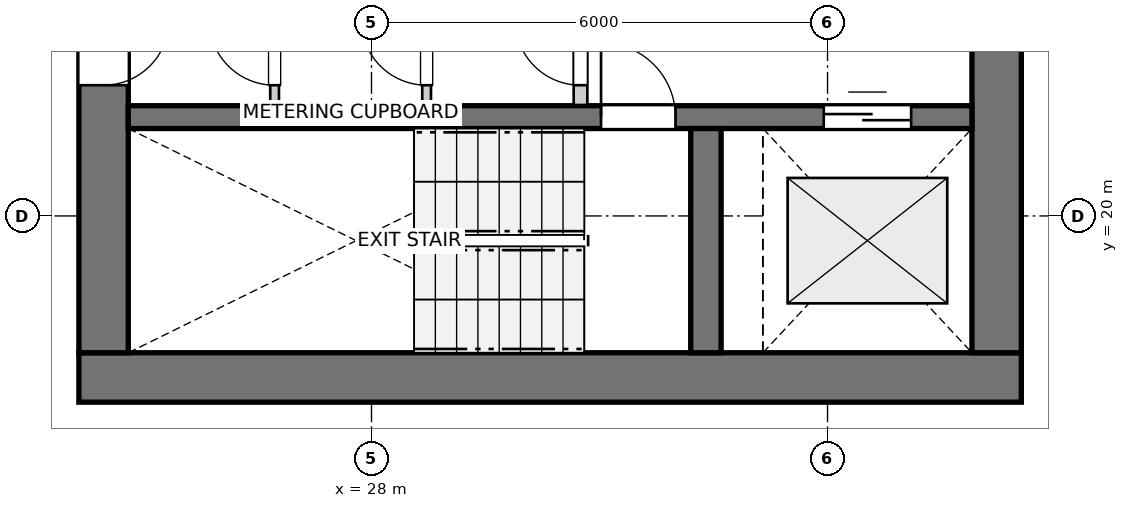
"""IFC4 building model, lengths in metres.
Left out: names, types, materials, properties, quantities, classifications, styles, units other than length and angle.
Written with IfcOpenShell. Run it as: python <this file> out.ifc"""

import sys

from ifc_helpers import new_model, si_unit, direction, frame, frame_2d, origin, place, context, subcontext, project, spatial, rectangle, extrude, source, transform, mapped, element, fill, save


model = new_model("IFC4")
c1 = context("Model", 3, precision=1e-05, world=origin(), true_north=direction((0.0, 1.0)))
c2 = subcontext(c1, "Body", "Model", "MODEL_VIEW")
j1 = project(units=[si_unit("LENGTHUNIT", "METRE"), si_unit("PLANEANGLEUNIT", "RADIAN")], contexts=[c1])
p1 = place(None, origin())
s1 = spatial("IfcSite", under=j1, at=p1, CompositionType="ELEMENT")
p2 = place(p1, origin())
s2 = spatial("IfcBuilding", under=s1, at=p2, CompositionType="ELEMENT")
p3 = place(p2, frame((0.0, 0.0, 124.8)))
s3 = spatial("IfcBuildingStorey", under=s2, at=p3, CompositionType="ELEMENT", Elevation=124.8)
p4 = place(p3, frame((24.15, 17.875, 0.0), z_axis=(0.0, 0.0, 1.0), x_axis=(1.0, 0.0, 0.0)))
e1 = element("IfcWall", 1, at=p4, inside=s3, PredefinedType="SHEAR", context=c2, shape_type="SweptSolid", body=[
    extrude(rectangle(XDim=12.4, YDim=0.65, at=frame_2d((6.2, 0.0))), origin(), (0.0, 0.0, 1.0), 2.9),
])
p5 = place(p3, frame((24.475, 33.8, 0.0), z_axis=(0.0, 0.0, 1.0), x_axis=(0.0, -1.0, 0.0)))
e2 = element("IfcWall", 2, at=p5, inside=s3, PredefinedType="SHEAR", context=c2, shape_type="SweptSolid", body=[
    extrude(rectangle(XDim=15.6, YDim=0.65, at=frame_2d((7.8, 0.0))), origin(), (0.0, 0.0, 1.0), 2.9),
])
p6 = place(p5, frame((7.05, 0.0, 0.0)))
e3 = element("IfcOpeningElement", 3, at=p6, cuts=e2, PredefinedType="OPENING", context=c2, shape_type="SweptSolid", body=[
    extrude(rectangle(XDim=1.5, YDim=2.15, at=frame_2d((0.75, 1.075))), frame((0.0, 0.335, 0.0), z_axis=(0.0, -1.0, 0.0), x_axis=(1.0, 0.0, 0.0)), (0.0, 0.0, 1.0), 0.67),
])
p7 = place(p5, frame((3.52, 0.0, 0.0)))
e4 = element("IfcOpeningElement", 4, at=p7, cuts=e2, PredefinedType="OPENING", context=c2, shape_type="SweptSolid", body=[
    extrude(rectangle(XDim=0.86, YDim=2.05, at=frame_2d((0.43, 1.025))), frame((0.0, 0.335, 0.0), z_axis=(0.0, -1.0, 0.0), x_axis=(1.0, 0.0, 0.0)), (0.0, 0.0, 1.0), 0.67),
])
p8 = place(p5, frame((11.22, 0.0, 0.0)))
e5 = element("IfcOpeningElement", 5, at=p8, cuts=e2, PredefinedType="OPENING", context=c2, shape_type="SweptSolid", body=[
    extrude(rectangle(XDim=0.86, YDim=2.05, at=frame_2d((0.43, 1.025))), frame((0.0, 0.335, 0.0), z_axis=(0.0, -1.0, 0.0), x_axis=(1.0, 0.0, 0.0)), (0.0, 0.0, 1.0), 0.67),
])
p9 = place(p3, frame((36.225, 18.2, 0.0), z_axis=(0.0, 0.0, 1.0), x_axis=(0.0, 1.0, 0.0)))
e6 = element("IfcWall", 6, at=p9, inside=s3, PredefinedType="SHEAR", context=c2, shape_type="SweptSolid", body=[
    extrude(rectangle(XDim=15.6, YDim=0.65, at=frame_2d((7.8, 0.0))), origin(), (0.0, 0.0, 1.0), 2.9),
])
p10 = place(p9, frame((4.25, 0.0, 0.0)))
e7 = element("IfcOpeningElement", 7, at=p10, cuts=e6, PredefinedType="OPENING", context=c2, shape_type="SweptSolid", body=[
    extrude(rectangle(XDim=1.1, YDim=2.15, at=frame_2d((0.55, 1.075))), frame((0.0, 0.335, 0.0), z_axis=(0.0, -1.0, 0.0), x_axis=(1.0, 0.0, 0.0)), (0.0, 0.0, 1.0), 0.67),
])
p11 = place(p9, frame((10.25, 0.0, 0.0)))
e8 = element("IfcOpeningElement", 8, at=p11, cuts=e6, PredefinedType="OPENING", context=c2, shape_type="SweptSolid", body=[
    extrude(rectangle(XDim=1.1, YDim=2.15, at=frame_2d((0.55, 1.075))), frame((0.0, 0.335, 0.0), z_axis=(0.0, -1.0, 0.0), x_axis=(1.0, 0.0, 0.0)), (0.0, 0.0, 1.0), 0.67),
])
p12 = place(p3, frame((24.8, 21.3, 0.0), z_axis=(0.0, 0.0, 1.0), x_axis=(1.0, 0.0, 0.0)))
e9 = element("IfcWall", 9, at=p12, inside=s3, PredefinedType="SHEAR", context=c2, shape_type="SweptSolid", body=[
    extrude(rectangle(XDim=11.1, YDim=0.3, at=frame_2d((5.55, 0.0))), origin(), (0.0, 0.0, 1.0), 2.9),
])
p13 = place(p12, frame((6.22, 0.0, 0.0)))
e10 = element("IfcOpeningElement", 10, at=p13, cuts=e9, PredefinedType="OPENING", context=c2, shape_type="SweptSolid", body=[
    extrude(rectangle(XDim=0.98, YDim=2.15, at=frame_2d((0.49, 1.075))), frame((0.0, 0.16, 0.0), z_axis=(0.0, -1.0, 0.0), x_axis=(1.0, 0.0, 0.0)), (0.0, 0.0, 1.0), 0.32),
])
p14 = place(p12, frame((9.15, 0.0, 0.0)))
e11 = element("IfcOpeningElement", 11, at=p14, cuts=e9, PredefinedType="OPENING", context=c2, shape_type="SweptSolid", body=[
    extrude(rectangle(XDim=1.15, YDim=2.15, at=frame_2d((0.575, 1.075))), frame((0.0, 0.16, 0.0), z_axis=(0.0, -1.0, 0.0), x_axis=(1.0, 0.0, 0.0)), (0.0, 0.0, 1.0), 0.32),
])
p15 = place(p3, frame((32.4, 18.2, 0.0), z_axis=(0.0, 0.0, 1.0), x_axis=(0.0, 1.0, 0.0)))
e12 = element("IfcWall", 12, at=p15, inside=s3, PredefinedType="SHEAR", context=c2, shape_type="SweptSolid", body=[
    extrude(rectangle(XDim=2.95, YDim=0.4, at=frame_2d((1.475, 0.0))), origin(), (0.0, 0.0, 1.0), 2.9),
])
p16 = place(p3, frame((30.75, 21.46, 0.0), z_axis=(0.0, 0.0, 1.0), x_axis=(0.0, 1.0, 0.0)))
e13 = element("IfcWall", 13, at=p16, inside=s3, PredefinedType="PARTITIONING", context=c2, shape_type="SweptSolid", body=[
    extrude(rectangle(XDim=3.11, YDim=0.18, at=frame_2d((1.555, 0.0))), origin(), (0.0, 0.0, 1.0), 2.9),
])
p17 = place(p16, frame((0.26, 0.0, 0.0)))
e14 = element("IfcOpeningElement", 14, at=p17, cuts=e13, PredefinedType="OPENING", context=c2, shape_type="SweptSolid", body=[
    extrude(rectangle(XDim=0.86, YDim=2.05, at=frame_2d((0.43, 1.025))), frame((0.0, 0.1, 0.0), z_axis=(0.0, -1.0, 0.0), x_axis=(1.0, 0.0, 0.0)), (0.0, 0.0, 1.0), 0.2),
])
p18 = place(p3, frame((26.725, 21.46, 0.0), z_axis=(0.0, 0.0, 1.0), x_axis=(0.0, 1.0, 0.0)))
e15 = element("IfcWall", 15, at=p18, inside=s3, PredefinedType="PARTITIONING", context=c2, shape_type="SweptSolid", body=[
    extrude(rectangle(XDim=1.38, YDim=0.115, at=frame_2d((0.69, 0.0))), origin(), (0.0, 0.0, 1.0), 2.9),
])
p19 = place(p18, frame((0.26, 0.0, 0.0)))
e16 = element("IfcOpeningElement", 16, at=p19, cuts=e15, PredefinedType="OPENING", context=c2, shape_type="SweptSolid", body=[
    extrude(rectangle(XDim=0.86, YDim=2.05, at=frame_2d((0.43, 1.025))), frame((0.0, 0.067, 0.0), z_axis=(0.0, -1.0, 0.0), x_axis=(1.0, 0.0, 0.0)), (0.0, 0.0, 1.0), 0.135),
])
p20 = place(p3, frame((28.725, 21.46, 0.0), z_axis=(0.0, 0.0, 1.0), x_axis=(0.0, 1.0, 0.0)))
e17 = element("IfcWall", 17, at=p20, inside=s3, PredefinedType="PARTITIONING", context=c2, shape_type="SweptSolid", body=[
    extrude(rectangle(XDim=1.38, YDim=0.115, at=frame_2d((0.69, 0.0))), origin(), (0.0, 0.0, 1.0), 2.9),
])
p21 = place(p20, frame((0.26, 0.0, 0.0)))
e18 = element("IfcOpeningElement", 18, at=p21, cuts=e17, PredefinedType="OPENING", context=c2, shape_type="SweptSolid", body=[
    extrude(rectangle(XDim=0.86, YDim=2.05, at=frame_2d((0.43, 1.025))), frame((0.0, 0.067, 0.0), z_axis=(0.0, -1.0, 0.0), x_axis=(1.0, 0.0, 0.0)), (0.0, 0.0, 1.0), 0.135),
])
m1 = source(origin(), c2, "Body", "SweptSolid", [
    extrude(rectangle(XDim=0.98, YDim=2.15, at=frame_2d((0.49, 1.075))), frame((0.0, 0.025, 0.0), z_axis=(0.0, -1.0, 0.0), x_axis=(1.0, 0.0, 0.0)), (0.0, 0.0, 1.0), 0.05),
])
p22 = place(p13, origin())
e19 = element("IfcDoor", 19, at=p22, inside=s3, OperationType="SINGLE_SWING_LEFT", PredefinedType="DOOR", context=c2, shape_type="MappedRepresentation", body=[
    mapped(m1, transform((0.0, 0.0, 0.0), x_axis=(1.0, 0.0, 0.0), y_axis=(0.0, 1.0, 0.0), z_axis=(0.0, 0.0, 1.0), scale=1.0)),
])
fill(e10, e19)
m2 = source(origin(), c2, "Body", "SweptSolid", [
    extrude(rectangle(XDim=1.15, YDim=2.15, at=frame_2d((0.575, 1.075))), frame((0.0, 0.025, 0.0), z_axis=(0.0, -1.0, 0.0), x_axis=(1.0, 0.0, 0.0)), (0.0, 0.0, 1.0), 0.05),
])
p23 = place(p14, origin())
e20 = element("IfcDoor", 20, at=p23, inside=s3, OperationType="DOUBLE_DOOR_SLIDING", PredefinedType="DOOR", context=c2, shape_type="MappedRepresentation", body=[
    mapped(m2, transform((0.0, 0.0, 0.0), x_axis=(1.0, 0.0, 0.0), y_axis=(0.0, 1.0, 0.0), z_axis=(0.0, 0.0, 1.0), scale=1.0)),
])
fill(e11, e20)
m3 = source(origin(), c2, "Body", "SweptSolid", [
    extrude(rectangle(XDim=0.86, YDim=2.05, at=frame_2d((0.43, 1.025))), frame((0.0, 0.025, 0.0), z_axis=(0.0, -1.0, 0.0), x_axis=(1.0, 0.0, 0.0)), (0.0, 0.0, 1.0), 0.05),
])
p24 = place(p8, origin())
e21 = element("IfcDoor", 21, at=p24, inside=s3, OperationType="SINGLE_SWING_LEFT", PredefinedType="DOOR", context=c2, shape_type="MappedRepresentation", body=[
    mapped(m3, transform((0.0, 0.0, 0.0), x_axis=(1.0, 0.0, 0.0), y_axis=(0.0, 1.0, 0.0), z_axis=(0.0, 0.0, 1.0), scale=1.0)),
])
fill(e5, e21)
p25 = place(p17, origin())
e22 = element("IfcDoor", 22, at=p25, inside=s3, OperationType="SINGLE_SWING_RIGHT", PredefinedType="DOOR", context=c2, shape_type="MappedRepresentation", body=[
    mapped(m3, transform((0.0, 0.0, 0.0), x_axis=(1.0, 0.0, 0.0), y_axis=(0.0, 1.0, 0.0), z_axis=(0.0, 0.0, 1.0), scale=1.0)),
])
fill(e14, e22)
p26 = place(p19, origin())
e23 = element("IfcDoor", 23, at=p26, inside=s3, OperationType="SINGLE_SWING_RIGHT", PredefinedType="DOOR", context=c2, shape_type="MappedRepresentation", body=[
    mapped(m3, transform((0.0, 0.0, 0.0), x_axis=(1.0, 0.0, 0.0), y_axis=(0.0, 1.0, 0.0), z_axis=(0.0, 0.0, 1.0), scale=1.0)),
])
fill(e16, e23)
p27 = place(p21, origin())
e24 = element("IfcDoor", 24, at=p27, inside=s3, OperationType="SINGLE_SWING_RIGHT", PredefinedType="DOOR", context=c2, shape_type="MappedRepresentation", body=[
    mapped(m3, transform((0.0, 0.0, 0.0), x_axis=(1.0, 0.0, 0.0), y_axis=(0.0, 1.0, 0.0), z_axis=(0.0, 0.0, 1.0), scale=1.0)),
])
fill(e18, e24)
save(model, sys.argv[1])
